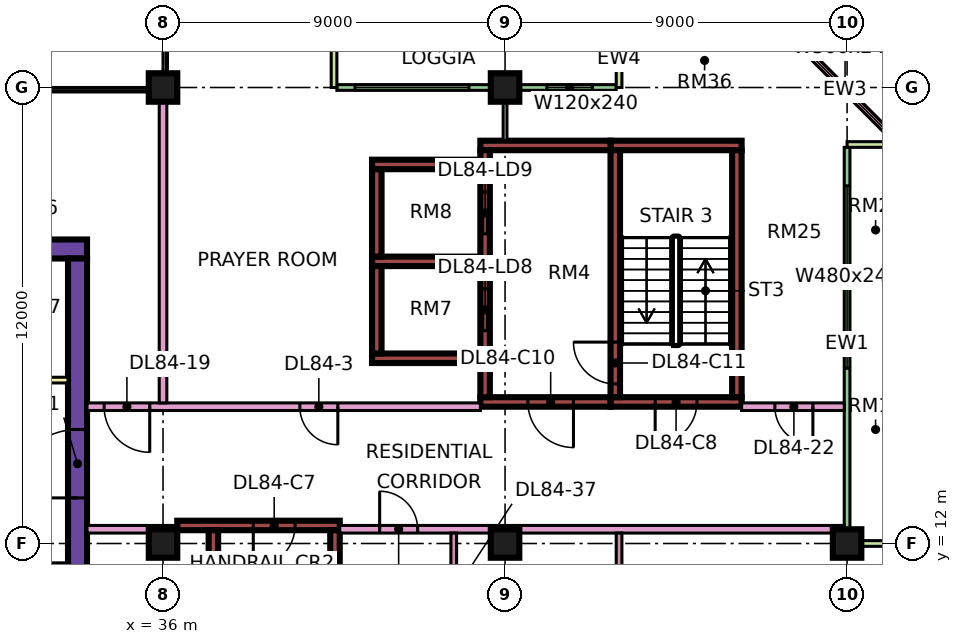
"""IFC4 building model, lengths in metres.
Left out: names, types, materials, properties, quantities, classifications, styles, units other than length and angle.
Written with IfcOpenShell. Run it as: python <this file> out.ifc"""

import sys

from ifc_helpers import new_model, si_unit, direction, frame, frame_2d, origin, origin_2d, place, context, subcontext, project, spatial, rectangle, extrude, element, fill, save


model = new_model("IFC4")
c1 = context("Model", 3, precision=1e-05, world=origin(), true_north=direction((0.0, 1.0)))
c2 = subcontext(c1, "Body", "Model", "MODEL_VIEW")
j1 = project(units=[si_unit("LENGTHUNIT", "METRE"), si_unit("PLANEANGLEUNIT", "RADIAN")], contexts=[c1])
p1 = place(None, origin())
s1 = spatial("IfcSite", under=j1, at=p1, CompositionType="ELEMENT")
p2 = place(p1, origin())
s2 = spatial("IfcBuilding", under=s1, at=p2, CompositionType="ELEMENT")
p3 = place(p2, frame((0.0, 0.0, 361.4)))
s3 = spatial("IfcBuildingStorey", under=s2, at=p3, CompositionType="ELEMENT", Elevation=361.4)
for number, where, z_axis, x_axis in (
    (1, (36.0, 12.0, 0.0), (0.0, 0.0, 1.0), (1.0, 0.0, 0.0)),
    (2, (36.0, 24.0, 0.0), (0.0, 0.0, 1.0), (1.0, 0.0, 0.0)),
    (3, (45.0, 12.0, 0.0), (0.0, 0.0, 1.0), (1.0, 0.0, 0.0)),
    (4, (45.0, 24.0, 0.0), (0.0, 0.0, 1.0), (1.0, 0.0, 0.0)),
    (5, (54.0, 12.0, 0.0), (0.0, 0.0, 1.0), (1.0, 0.0, 0.0)),
):
    element("IfcColumn", number, at=place(p3, frame(where, z_axis=z_axis, x_axis=x_axis)), inside=s3, PredefinedType="COLUMN", context=c2, shape_type="SweptSolid", body=[
        extrude(rectangle(XDim=0.75, YDim=0.75, at=origin_2d()), origin(), (0.0, 0.0, 1.0), 3.75),
    ])
p4 = place(p3, frame((9.0, 19.75, 0.0), z_axis=(0.0, 0.0, 1.0), x_axis=(1.0, 0.0, 0.0)))
e6 = element("IfcWall", 6, at=p4, inside=s3, PredefinedType="SHEAR", context=c2, shape_type="SweptSolid", body=[
    extrude(rectangle(XDim=25.0, YDim=0.5, at=frame_2d((12.5, 0.0))), origin(), (0.0, 0.0, 1.0), 3.75),
])
p5 = place(p4, frame((19.1, 0.0, 0.0)))
e7 = element("IfcOpeningElement", 7, at=p5, cuts=e6, PredefinedType="OPENING", context=c2, shape_type="SweptSolid", body=[
    extrude(rectangle(XDim=1.8, YDim=2.4, at=frame_2d((0.9, 1.2))), frame((0.0, 0.26, 0.0), z_axis=(0.0, -1.0, 0.0), x_axis=(1.0, 0.0, 0.0)), (0.0, 0.0, 1.0), 0.52),
])
p6 = place(p3, frame((33.75, 7.5, 0.0), z_axis=(0.0, 0.0, 1.0), x_axis=(0.0, 1.0, 0.0)))
e8 = element("IfcWall", 8, at=p6, inside=s3, PredefinedType="SHEAR", context=c2, shape_type="SweptSolid", body=[
    extrude(rectangle(XDim=12.0, YDim=0.5, at=frame_2d((6.0, 0.0))), origin(), (0.0, 0.0, 1.0), 3.75),
])
p7 = place(p6, frame((5.7, 0.0, 0.0)))
e9 = element("IfcOpeningElement", 9, at=p7, cuts=e8, PredefinedType="OPENING", context=c2, shape_type="SweptSolid", body=[
    extrude(rectangle(XDim=1.8, YDim=2.4, at=frame_2d((0.9, 1.2))), frame((0.0, 0.26, 0.0), z_axis=(0.0, -1.0, 0.0), x_axis=(1.0, 0.0, 0.0)), (0.0, 0.0, 1.0), 0.52),
])
p8 = place(p3, frame((36.375, 12.475, 0.0), z_axis=(0.0, 0.0, 1.0), x_axis=(1.0, 0.0, 0.0)))
e10 = element("IfcWall", 10, at=p8, inside=s3, PredefinedType="SHEAR", context=c2, shape_type="SweptSolid", body=[
    extrude(rectangle(XDim=4.275, YDim=0.25, at=frame_2d((2.137, 0.0))), origin(), (0.0, 0.0, 1.0), 3.75),
])
p9 = place(p8, frame((2.0, 0.0, 0.0)))
e11 = element("IfcOpeningElement", 11, at=p9, cuts=e10, PredefinedType="OPENING", context=c2, shape_type="SweptSolid", body=[
    extrude(rectangle(XDim=1.1, YDim=2.2, at=frame_2d((0.55, 1.1))), frame((0.0, 0.135, 0.0), z_axis=(0.0, -1.0, 0.0), x_axis=(1.0, 0.0, 0.0)), (0.0, 0.0, 1.0), 0.27),
])
for number, where, z_axis, x_axis in (
    (12, (37.325, 5.85, 0.0), (0.0, 0.0, 1.0), (0.0, 1.0, 0.0)),
    (13, (40.525, 5.85, 0.0), (0.0, 0.0, 1.0), (0.0, 1.0, 0.0)),
):
    element("IfcWall", number, at=place(p3, frame(where, z_axis=z_axis, x_axis=x_axis)), inside=s3, PredefinedType="SHEAR", context=c2, shape_type="SweptSolid", body=[
        extrude(rectangle(XDim=6.5, YDim=0.25, at=frame_2d((3.25, 0.0))), origin(), (0.0, 0.0, 1.0), 3.75),
    ])
p10 = place(p3, frame((47.775, 15.725, 0.0), z_axis=(0.0, 0.0, 1.0), x_axis=(1.0, 0.0, 0.0)))
e14 = element("IfcWall", 14, at=p10, inside=s3, PredefinedType="SHEAR", context=c2, shape_type="SweptSolid", body=[
    extrude(rectangle(XDim=3.45, YDim=0.25, at=frame_2d((1.725, 0.0))), origin(), (0.0, 0.0, 1.0), 3.75),
])
p11 = place(p10, frame((1.175, 0.0, 0.0)))
e15 = element("IfcOpeningElement", 15, at=p11, cuts=e14, PredefinedType="OPENING", context=c2, shape_type="SweptSolid", body=[
    extrude(rectangle(XDim=1.1, YDim=2.2, at=frame_2d((0.55, 1.1))), frame((0.0, 0.135, 0.0), z_axis=(0.0, -1.0, 0.0), x_axis=(1.0, 0.0, 0.0)), (0.0, 0.0, 1.0), 0.27),
])
p12 = place(p3, frame((47.775, 22.475, 0.0), z_axis=(0.0, 0.0, 1.0), x_axis=(1.0, 0.0, 0.0)))
e16 = element("IfcWall", 16, at=p12, inside=s3, PredefinedType="SHEAR", context=c2, shape_type="SweptSolid", body=[
    extrude(rectangle(XDim=3.45, YDim=0.25, at=frame_2d((1.725, 0.0))), origin(), (0.0, 0.0, 1.0), 3.75),
])
p13 = place(p3, frame((47.9, 15.85, 0.0), z_axis=(0.0, 0.0, 1.0), x_axis=(0.0, 1.0, 0.0)))
e17 = element("IfcWall", 17, at=p13, inside=s3, PredefinedType="SHEAR", context=c2, shape_type="SweptSolid", body=[
    extrude(rectangle(XDim=6.5, YDim=0.25, at=frame_2d((3.25, 0.0))), origin(), (0.0, 0.0, 1.0), 3.75),
])
p14 = place(p13, frame((0.35, 0.0, 0.0)))
e18 = element("IfcOpeningElement", 18, at=p14, cuts=e17, PredefinedType="OPENING", context=c2, shape_type="SweptSolid", body=[
    extrude(rectangle(XDim=1.1, YDim=2.2, at=frame_2d((0.55, 1.1))), frame((0.0, 0.135, 0.0), z_axis=(0.0, -1.0, 0.0), x_axis=(1.0, 0.0, 0.0)), (0.0, 0.0, 1.0), 0.27),
])
p15 = place(p3, frame((51.1, 15.85, 0.0), z_axis=(0.0, 0.0, 1.0), x_axis=(0.0, 1.0, 0.0)))
e19 = element("IfcWall", 19, at=p15, inside=s3, PredefinedType="SHEAR", context=c2, shape_type="SweptSolid", body=[
    extrude(rectangle(XDim=6.5, YDim=0.25, at=frame_2d((3.25, 0.0))), origin(), (0.0, 0.0, 1.0), 3.75),
])
p16 = place(p3, frame((44.35, 15.725, 0.0), z_axis=(0.0, 0.0, 1.0), x_axis=(1.0, 0.0, 0.0)))
e20 = element("IfcWall", 20, at=p16, inside=s3, PredefinedType="SHEAR", context=c2, shape_type="SweptSolid", body=[
    extrude(rectangle(XDim=3.425, YDim=0.25, at=frame_2d((1.712, 0.0))), origin(), (0.0, 0.0, 1.0), 3.75),
])
p17 = place(p16, frame((1.25, 0.0, 0.0)))
e21 = element("IfcOpeningElement", 21, at=p17, cuts=e20, PredefinedType="OPENING", context=c2, shape_type="SweptSolid", body=[
    extrude(rectangle(XDim=1.2, YDim=2.2, at=frame_2d((0.6, 1.1))), frame((0.0, 0.135, 0.0), z_axis=(0.0, -1.0, 0.0), x_axis=(1.0, 0.0, 0.0)), (0.0, 0.0, 1.0), 0.27),
])
p18 = place(p3, frame((44.35, 22.475, 0.0), z_axis=(0.0, 0.0, 1.0), x_axis=(1.0, 0.0, 0.0)))
e22 = element("IfcWall", 22, at=p18, inside=s3, PredefinedType="SHEAR", context=c2, shape_type="SweptSolid", body=[
    extrude(rectangle(XDim=3.425, YDim=0.25, at=frame_2d((1.712, 0.0))), origin(), (0.0, 0.0, 1.0), 3.75),
])
p19 = place(p3, frame((44.475, 15.85, 0.0), z_axis=(0.0, 0.0, 1.0), x_axis=(0.0, 1.0, 0.0)))
e23 = element("IfcWall", 23, at=p19, inside=s3, PredefinedType="SHEAR", context=c2, shape_type="SweptSolid", body=[
    extrude(rectangle(XDim=6.5, YDim=0.25, at=frame_2d((3.25, 0.0))), origin(), (0.0, 0.0, 1.0), 3.75),
])
p20 = place(p19, frame((1.75, 0.0, 0.0)))
e24 = element("IfcOpeningElement", 24, at=p20, cuts=e23, PredefinedType="OPENING", context=c2, shape_type="SweptSolid", body=[
    extrude(rectangle(XDim=1.1, YDim=2.2, at=frame_2d((0.55, 1.1))), frame((0.0, 0.135, 0.0), z_axis=(0.0, -1.0, 0.0), x_axis=(1.0, 0.0, 0.0)), (0.0, 0.0, 1.0), 0.27),
])
p21 = place(p19, frame((4.3, 0.0, 0.0)))
e25 = element("IfcOpeningElement", 25, at=p21, cuts=e23, PredefinedType="OPENING", context=c2, shape_type="SweptSolid", body=[
    extrude(rectangle(XDim=1.1, YDim=2.2, at=frame_2d((0.55, 1.1))), frame((0.0, 0.135, 0.0), z_axis=(0.0, -1.0, 0.0), x_axis=(1.0, 0.0, 0.0)), (0.0, 0.0, 1.0), 0.27),
])
for number, where, z_axis, x_axis in (
    (26, (41.5, 16.875, 0.0), (0.0, 0.0, 1.0), (1.0, 0.0, 0.0)),
    (27, (41.5, 19.425, 0.0), (0.0, 0.0, 1.0), (1.0, 0.0, 0.0)),
    (28, (41.5, 21.975, 0.0), (0.0, 0.0, 1.0), (1.0, 0.0, 0.0)),
):
    element("IfcWall", number, at=place(p3, frame(where, z_axis=z_axis, x_axis=x_axis)), inside=s3, PredefinedType="SHEAR", context=c2, shape_type="SweptSolid", body=[
        extrude(rectangle(XDim=2.85, YDim=0.25, at=frame_2d((1.425, 0.0))), origin(), (0.0, 0.0, 1.0), 3.75),
    ])
for number, where, z_axis, x_axis in (
    (29, (41.625, 17.0, 0.0), (0.0, 0.0, 1.0), (0.0, 1.0, 0.0)),
    (30, (41.625, 19.55, 0.0), (0.0, 0.0, 1.0), (0.0, 1.0, 0.0)),
):
    element("IfcWall", number, at=place(p3, frame(where, z_axis=z_axis, x_axis=x_axis)), inside=s3, PredefinedType="SHEAR", context=c2, shape_type="SweptSolid", body=[
        extrude(rectangle(XDim=2.3, YDim=0.25, at=frame_2d((1.15, 0.0))), origin(), (0.0, 0.0, 1.0), 3.75),
    ])
p22 = place(p3, frame((47.925, 24.0, 0.0), z_axis=(0.0, 0.0, 1.0), x_axis=(-1.0, 0.0, 0.0)))
e31 = element("IfcWall", 31, at=p22, inside=s3, PredefinedType="SOLIDWALL", context=c2, shape_type="SweptSolid", body=[
    extrude(rectangle(XDim=7.35, YDim=0.15, at=frame_2d((3.675, 0.0))), origin(), (0.0, 0.0, 1.0), 3.35),
])
p23 = place(p22, frame((0.625, 0.0, 0.45)))
e32 = element("IfcOpeningElement", 32, at=p23, cuts=e31, PredefinedType="OPENING", context=c2, shape_type="SweptSolid", body=[
    extrude(rectangle(XDim=1.2, YDim=2.4, at=frame_2d((0.6, 1.2))), frame((0.0, 0.085, 0.0), z_axis=(0.0, -1.0, 0.0), x_axis=(1.0, 0.0, 0.0)), (0.0, 0.0, 1.0), 0.17),
])
p24 = place(p22, frame((3.875, 0.0, 0.45)))
e33 = element("IfcOpeningElement", 33, at=p24, cuts=e31, PredefinedType="OPENING", context=c2, shape_type="SweptSolid", body=[
    extrude(rectangle(XDim=3.0, YDim=2.4, at=frame_2d((1.5, 1.2))), frame((0.0, 0.085, 0.0), z_axis=(0.0, -1.0, 0.0), x_axis=(1.0, 0.0, 0.0)), (0.0, 0.0, 1.0), 0.17),
])
for number, where, z_axis, x_axis in (
    (34, (48.0, 25.5, 0.0), (0.0, 0.0, 1.0), (0.0, -1.0, 0.0)),
    (35, (40.5, 25.5, 0.0), (0.0, 0.0, 1.0), (0.0, -1.0, 0.0)),
):
    element("IfcWall", number, at=place(p3, frame(where, z_axis=z_axis, x_axis=x_axis)), inside=s3, PredefinedType="SOLIDWALL", context=c2, shape_type="SweptSolid", body=[
        extrude(rectangle(XDim=1.5, YDim=0.15, at=frame_2d((0.75, 0.0))), origin(), (0.0, 0.0, 1.0), 3.35),
    ])
p25 = place(p3, frame((54.0, 12.075, 0.0), z_axis=(0.0, 0.0, 1.0), x_axis=(0.0, 1.0, 0.0)))
e36 = element("IfcWall", 36, at=p25, inside=s3, PredefinedType="SOLIDWALL", context=c2, shape_type="SweptSolid", body=[
    extrude(rectangle(XDim=10.35, YDim=0.15, at=frame_2d((5.175, 0.0))), origin(), (0.0, 0.0, 1.0), 3.35),
])
p26 = place(p25, frame((4.538, 0.0, 0.45)))
e37 = element("IfcOpeningElement", 37, at=p26, cuts=e36, PredefinedType="OPENING", context=c2, shape_type="SweptSolid", body=[
    extrude(rectangle(XDim=4.8, YDim=2.4, at=frame_2d((2.4, 1.2))), frame((0.0, 0.085, 0.0), z_axis=(0.0, -1.0, 0.0), x_axis=(1.0, 0.0, 0.0)), (0.0, 0.0, 1.0), 0.17),
])
for number, where, z_axis, x_axis in (
    (38, (55.5, 12.0, 0.0), (0.0, 0.0, 1.0), (-1.0, 0.0, 0.0)),
    (39, (55.5, 22.5, 0.0), (0.0, 0.0, 1.0), (-1.0, 0.0, 0.0)),
):
    element("IfcWall", number, at=place(p3, frame(where, z_axis=z_axis, x_axis=x_axis)), inside=s3, PredefinedType="SOLIDWALL", context=c2, shape_type="SweptSolid", body=[
        extrude(rectangle(XDim=1.5, YDim=0.15, at=frame_2d((0.75, 0.0))), origin(), (0.0, 0.0, 1.0), 3.35),
    ])
p27 = place(p3, frame((55.447, 22.447, 0.0), z_axis=(0.0, 0.0, 1.0), x_axis=(-0.707106781187, 0.707106781187, 0.0)))
e40 = element("IfcWall", 40, at=p27, inside=s3, PredefinedType="SOLIDWALL", context=c2, shape_type="SweptSolid", body=[
    extrude(rectangle(XDim=4.243, YDim=0.15, at=frame_2d((2.121, 0.0))), origin(), (0.0, 0.0, 1.0), 3.35),
])
p28 = place(p27, frame((0.621, 0.0, 0.45)))
e41 = element("IfcOpeningElement", 41, at=p28, cuts=e40, PredefinedType="OPENING", context=c2, shape_type="SweptSolid", body=[
    extrude(rectangle(XDim=3.0, YDim=2.4, at=frame_2d((1.5, 1.2))), frame((0.0, 0.085, 0.0), z_axis=(0.0, -1.0, 0.0), x_axis=(1.0, 0.0, 0.0)), (0.0, 0.0, 1.0), 0.17),
])
p29 = place(p3, frame((31.5, 16.3, 0.0), z_axis=(0.0, 0.0, 1.0), x_axis=(1.0, 0.0, 0.0)))
e42 = element("IfcWall", 42, at=p29, inside=s3, PredefinedType="PARTITIONING", context=c2, shape_type="SweptSolid", body=[
    extrude(rectangle(XDim=2.0, YDim=0.15, at=frame_2d((1.0, 0.0))), origin(), (0.0, 0.0, 1.0), 3.35),
])
p30 = place(p3, frame((34.0, 12.375, 0.0), z_axis=(0.0, 0.0, 1.0), x_axis=(1.0, 0.0, 0.0)))
e43 = element("IfcWall", 43, at=p30, inside=s3, PredefinedType="PARTITIONING", context=c2, shape_type="SweptSolid", body=[
    extrude(rectangle(XDim=2.376, YDim=0.2, at=frame_2d((1.188, 0.0))), origin(), (0.0, 0.0, 1.0), 3.35),
])
p31 = place(p3, frame((34.0, 15.6, 0.0), z_axis=(0.0, 0.0, 1.0), x_axis=(1.0, 0.0, 0.0)))
e44 = element("IfcWall", 44, at=p31, inside=s3, PredefinedType="PARTITIONING", context=c2, shape_type="SweptSolid", body=[
    extrude(rectangle(XDim=10.35, YDim=0.2, at=frame_2d((5.175, 0.0))), origin(), (0.0, 0.0, 1.0), 3.35),
])
p32 = place(p31, frame((5.6, 0.0, 0.0)))
e45 = element("IfcOpeningElement", 45, at=p32, cuts=e44, PredefinedType="OPENING", context=c2, shape_type="SweptSolid", body=[
    extrude(rectangle(XDim=1.0, YDim=2.1, at=frame_2d((0.5, 1.05))), frame((0.0, 0.11, 0.0), z_axis=(0.0, -1.0, 0.0), x_axis=(1.0, 0.0, 0.0)), (0.0, 0.0, 1.0), 0.22),
])
p33 = place(p31, frame((0.45, 0.0, 0.0)))
e46 = element("IfcOpeningElement", 46, at=p33, cuts=e44, PredefinedType="OPENING", context=c2, shape_type="SweptSolid", body=[
    extrude(rectangle(XDim=1.2, YDim=2.1, at=frame_2d((0.6, 1.05))), frame((0.0, 0.11, 0.0), z_axis=(0.0, -1.0, 0.0), x_axis=(1.0, 0.0, 0.0)), (0.0, 0.0, 1.0), 0.22),
])
p34 = place(p3, frame((36.0, 15.7, 0.0), z_axis=(0.0, 0.0, 1.0), x_axis=(0.0, 1.0, 0.0)))
e47 = element("IfcWall", 47, at=p34, inside=s3, PredefinedType="PARTITIONING", context=c2, shape_type="SweptSolid", body=[
    extrude(rectangle(XDim=8.3, YDim=0.2, at=frame_2d((4.15, 0.0))), origin(), (0.0, 0.0, 1.0), 3.35),
])
p35 = place(p3, frame((40.65, 12.375, 0.0), z_axis=(0.0, 0.0, 1.0), x_axis=(1.0, 0.0, 0.0)))
e48 = element("IfcWall", 48, at=p35, inside=s3, PredefinedType="PARTITIONING", context=c2, shape_type="SweptSolid", body=[
    extrude(rectangle(XDim=13.276, YDim=0.2, at=frame_2d((6.638, 0.0))), origin(), (0.0, 0.0, 1.0), 3.35),
])
p36 = place(p35, frame((1.05, 0.0, 0.0)))
e49 = element("IfcOpeningElement", 49, at=p36, cuts=e48, PredefinedType="OPENING", context=c2, shape_type="SweptSolid", body=[
    extrude(rectangle(XDim=1.0, YDim=2.1, at=frame_2d((0.5, 1.05))), frame((0.0, 0.11, 0.0), z_axis=(0.0, -1.0, 0.0), x_axis=(1.0, 0.0, 0.0)), (0.0, 0.0, 1.0), 0.22),
])
p37 = place(p3, frame((43.65, 5.975, 0.0), z_axis=(0.0, 0.0, 1.0), x_axis=(0.0, 1.0, 0.0)))
e50 = element("IfcWall", 50, at=p37, inside=s3, PredefinedType="PARTITIONING", context=c2, shape_type="SweptSolid", body=[
    extrude(rectangle(XDim=6.3, YDim=0.15, at=frame_2d((3.15, 0.0))), origin(), (0.0, 0.0, 1.0), 3.35),
])
p38 = place(p37, frame((4.275, 0.0, 0.0)))
e51 = element("IfcOpeningElement", 51, at=p38, cuts=e50, PredefinedType="OPENING", context=c2, shape_type="SweptSolid", body=[
    extrude(rectangle(XDim=0.9, YDim=2.1, at=frame_2d((0.45, 1.05))), frame((0.0, 0.085, 0.0), z_axis=(0.0, -1.0, 0.0), x_axis=(1.0, 0.0, 0.0)), (0.0, 0.0, 1.0), 0.17),
])
p39 = place(p3, frame((45.0, 22.6, 0.0), z_axis=(0.0, 0.0, 1.0), x_axis=(0.0, 1.0, 0.0)))
e52 = element("IfcWall", 52, at=p39, inside=s3, PredefinedType="PARTITIONING", context=c2, shape_type="SweptSolid", body=[
    extrude(rectangle(XDim=1.326, YDim=0.1, at=frame_2d((0.663, 0.0))), origin(), (0.0, 0.0, 1.0), 3.35),
])
p40 = place(p3, frame((48.0, 5.975, 0.0), z_axis=(0.0, 0.0, 1.0), x_axis=(0.0, 1.0, 0.0)))
e53 = element("IfcWall", 53, at=p40, inside=s3, PredefinedType="PARTITIONING", context=c2, shape_type="SweptSolid", body=[
    extrude(rectangle(XDim=6.3, YDim=0.15, at=frame_2d((3.15, 0.0))), origin(), (0.0, 0.0, 1.0), 3.35),
])
p41 = place(p3, frame((51.225, 15.6, 0.0), z_axis=(0.0, 0.0, 1.0), x_axis=(1.0, 0.0, 0.0)))
e54 = element("IfcWall", 54, at=p41, inside=s3, PredefinedType="PARTITIONING", context=c2, shape_type="SweptSolid", body=[
    extrude(rectangle(XDim=2.701, YDim=0.2, at=frame_2d((1.351, 0.0))), origin(), (0.0, 0.0, 1.0), 3.35),
])
p42 = place(p41, frame((0.875, 0.0, 0.0)))
e55 = element("IfcOpeningElement", 55, at=p42, cuts=e54, PredefinedType="OPENING", context=c2, shape_type="SweptSolid", body=[
    extrude(rectangle(XDim=1.0, YDim=2.1, at=frame_2d((0.5, 1.05))), frame((0.0, 0.11, 0.0), z_axis=(0.0, -1.0, 0.0), x_axis=(1.0, 0.0, 0.0)), (0.0, 0.0, 1.0), 0.22),
])
p43 = place(p23, origin())
e56 = element("IfcWindow", 56, at=p43, inside=s3, PartitioningType="SINGLE_PANEL", PredefinedType="WINDOW", context=c2, shape_type="SweptSolid", body=[
    extrude(rectangle(XDim=1.2, YDim=2.4, at=frame_2d((0.6, 1.2))), frame((0.0, 0.03, 0.0), z_axis=(0.0, -1.0, 0.0), x_axis=(1.0, 0.0, 0.0)), (0.0, 0.0, 1.0), 0.06),
])
fill(e32, e56)
p44 = place(p24, origin())
e57 = element("IfcWindow", 57, at=p44, inside=s3, PartitioningType="SINGLE_PANEL", PredefinedType="WINDOW", context=c2, shape_type="SweptSolid", body=[
    extrude(rectangle(XDim=3.0, YDim=2.4, at=frame_2d((1.5, 1.2))), frame((0.0, 0.03, 0.0), z_axis=(0.0, -1.0, 0.0), x_axis=(1.0, 0.0, 0.0)), (0.0, 0.0, 1.0), 0.06),
])
fill(e33, e57)
p45 = place(p26, origin())
e58 = element("IfcWindow", 58, at=p45, inside=s3, PartitioningType="SINGLE_PANEL", PredefinedType="WINDOW", context=c2, shape_type="SweptSolid", body=[
    extrude(rectangle(XDim=4.8, YDim=2.4, at=frame_2d((2.4, 1.2))), frame((0.0, 0.03, 0.0), z_axis=(0.0, -1.0, 0.0), x_axis=(1.0, 0.0, 0.0)), (0.0, 0.0, 1.0), 0.06),
])
fill(e37, e58)
p46 = place(p28, origin())
e59 = element("IfcWindow", 59, at=p46, inside=s3, PartitioningType="SINGLE_PANEL", PredefinedType="WINDOW", context=c2, shape_type="SweptSolid", body=[
    extrude(rectangle(XDim=3.0, YDim=2.4, at=frame_2d((1.5, 1.2))), frame((0.0, 0.03, 0.0), z_axis=(0.0, -1.0, 0.0), x_axis=(1.0, 0.0, 0.0)), (0.0, 0.0, 1.0), 0.06),
])
fill(e41, e59)
p47 = place(p7, origin())
e60 = element("IfcDoor", 60, at=p47, inside=s3, OperationType="DOUBLE_DOOR_SINGLE_SWING", PredefinedType="DOOR", context=c2, shape_type="SweptSolid", body=[
    extrude(rectangle(XDim=1.8, YDim=2.4, at=frame_2d((0.9, 1.2))), frame((0.0, 0.025, 0.0), z_axis=(0.0, -1.0, 0.0), x_axis=(1.0, 0.0, 0.0)), (0.0, 0.0, 1.0), 0.05),
])
fill(e9, e60)
p48 = place(p9, frame((1.1, 0.0, 0.0), z_axis=(0.0, 0.0, 1.0), x_axis=(-1.0, 0.0, 0.0)))
e61 = element("IfcDoor", 61, at=p48, inside=s3, OperationType="SINGLE_SWING_LEFT", PredefinedType="DOOR", context=c2, shape_type="SweptSolid", body=[
    extrude(rectangle(XDim=1.1, YDim=2.2, at=frame_2d((0.55, 1.1))), frame((0.0, 0.025, 0.0), z_axis=(0.0, -1.0, 0.0), x_axis=(1.0, 0.0, 0.0)), (0.0, 0.0, 1.0), 0.05),
])
fill(e11, e61)
p49 = place(p11, frame((1.1, 0.0, 0.0), z_axis=(0.0, 0.0, 1.0), x_axis=(-1.0, 0.0, 0.0)))
e62 = element("IfcDoor", 62, at=p49, inside=s3, OperationType="SINGLE_SWING_LEFT", PredefinedType="DOOR", context=c2, shape_type="SweptSolid", body=[
    extrude(rectangle(XDim=1.1, YDim=2.2, at=frame_2d((0.55, 1.1))), frame((0.0, 0.025, 0.0), z_axis=(0.0, -1.0, 0.0), x_axis=(1.0, 0.0, 0.0)), (0.0, 0.0, 1.0), 0.05),
])
fill(e15, e62)
p50 = place(p17, origin())
e63 = element("IfcDoor", 63, at=p50, inside=s3, OperationType="SINGLE_SWING_RIGHT", PredefinedType="DOOR", context=c2, shape_type="SweptSolid", body=[
    extrude(rectangle(XDim=1.2, YDim=2.2, at=frame_2d((0.6, 1.1))), frame((0.0, 0.025, 0.0), z_axis=(0.0, -1.0, 0.0), x_axis=(1.0, 0.0, 0.0)), (0.0, 0.0, 1.0), 0.05),
])
fill(e21, e63)
p51 = place(p14, frame((1.1, 0.0, 0.0), z_axis=(0.0, 0.0, 1.0), x_axis=(-1.0, 0.0, 0.0)))
e64 = element("IfcDoor", 64, at=p51, inside=s3, OperationType="SINGLE_SWING_RIGHT", PredefinedType="DOOR", context=c2, shape_type="SweptSolid", body=[
    extrude(rectangle(XDim=1.1, YDim=2.2, at=frame_2d((0.55, 1.1))), frame((0.0, 0.025, 0.0), z_axis=(0.0, -1.0, 0.0), x_axis=(1.0, 0.0, 0.0)), (0.0, 0.0, 1.0), 0.05),
])
fill(e18, e64)
p52 = place(p20, origin())
e65 = element("IfcDoor", 65, at=p52, inside=s3, OperationType="DOUBLE_DOOR_SLIDING", PredefinedType="DOOR", context=c2, shape_type="SweptSolid", body=[
    extrude(rectangle(XDim=1.1, YDim=2.2, at=frame_2d((0.55, 1.1))), frame((0.0, 0.025, 0.0), z_axis=(0.0, -1.0, 0.0), x_axis=(1.0, 0.0, 0.0)), (0.0, 0.0, 1.0), 0.05),
])
fill(e24, e65)
p53 = place(p21, origin())
e66 = element("IfcDoor", 66, at=p53, inside=s3, OperationType="DOUBLE_DOOR_SLIDING", PredefinedType="DOOR", context=c2, shape_type="SweptSolid", body=[
    extrude(rectangle(XDim=1.1, YDim=2.2, at=frame_2d((0.55, 1.1))), frame((0.0, 0.025, 0.0), z_axis=(0.0, -1.0, 0.0), x_axis=(1.0, 0.0, 0.0)), (0.0, 0.0, 1.0), 0.05),
])
fill(e25, e66)
p54 = place(p32, origin())
e67 = element("IfcDoor", 67, at=p54, inside=s3, OperationType="SINGLE_SWING_RIGHT", PredefinedType="DOOR", context=c2, shape_type="SweptSolid", body=[
    extrude(rectangle(XDim=1.0, YDim=2.1, at=frame_2d((0.5, 1.05))), frame((0.0, 0.025, 0.0), z_axis=(0.0, -1.0, 0.0), x_axis=(1.0, 0.0, 0.0)), (0.0, 0.0, 1.0), 0.05),
])
fill(e45, e67)
p55 = place(p33, origin())
e68 = element("IfcDoor", 68, at=p55, inside=s3, OperationType="SINGLE_SWING_RIGHT", PredefinedType="DOOR", context=c2, shape_type="SweptSolid", body=[
    extrude(rectangle(XDim=1.2, YDim=2.1, at=frame_2d((0.6, 1.05))), frame((0.0, 0.025, 0.0), z_axis=(0.0, -1.0, 0.0), x_axis=(1.0, 0.0, 0.0)), (0.0, 0.0, 1.0), 0.05),
])
fill(e46, e68)
p56 = place(p42, origin())
e69 = element("IfcDoor", 69, at=p56, inside=s3, OperationType="SINGLE_SWING_RIGHT", PredefinedType="DOOR", context=c2, shape_type="SweptSolid", body=[
    extrude(rectangle(XDim=1.0, YDim=2.1, at=frame_2d((0.5, 1.05))), frame((0.0, 0.025, 0.0), z_axis=(0.0, -1.0, 0.0), x_axis=(1.0, 0.0, 0.0)), (0.0, 0.0, 1.0), 0.05),
])
fill(e55, e69)
p57 = place(p36, origin())
e70 = element("IfcDoor", 70, at=p57, inside=s3, OperationType="SINGLE_SWING_LEFT", PredefinedType="DOOR", context=c2, shape_type="SweptSolid", body=[
    extrude(rectangle(XDim=1.0, YDim=2.1, at=frame_2d((0.5, 1.05))), frame((0.0, 0.025, 0.0), z_axis=(0.0, -1.0, 0.0), x_axis=(1.0, 0.0, 0.0)), (0.0, 0.0, 1.0), 0.05),
])
fill(e49, e70)
save(model, sys.argv[1])
